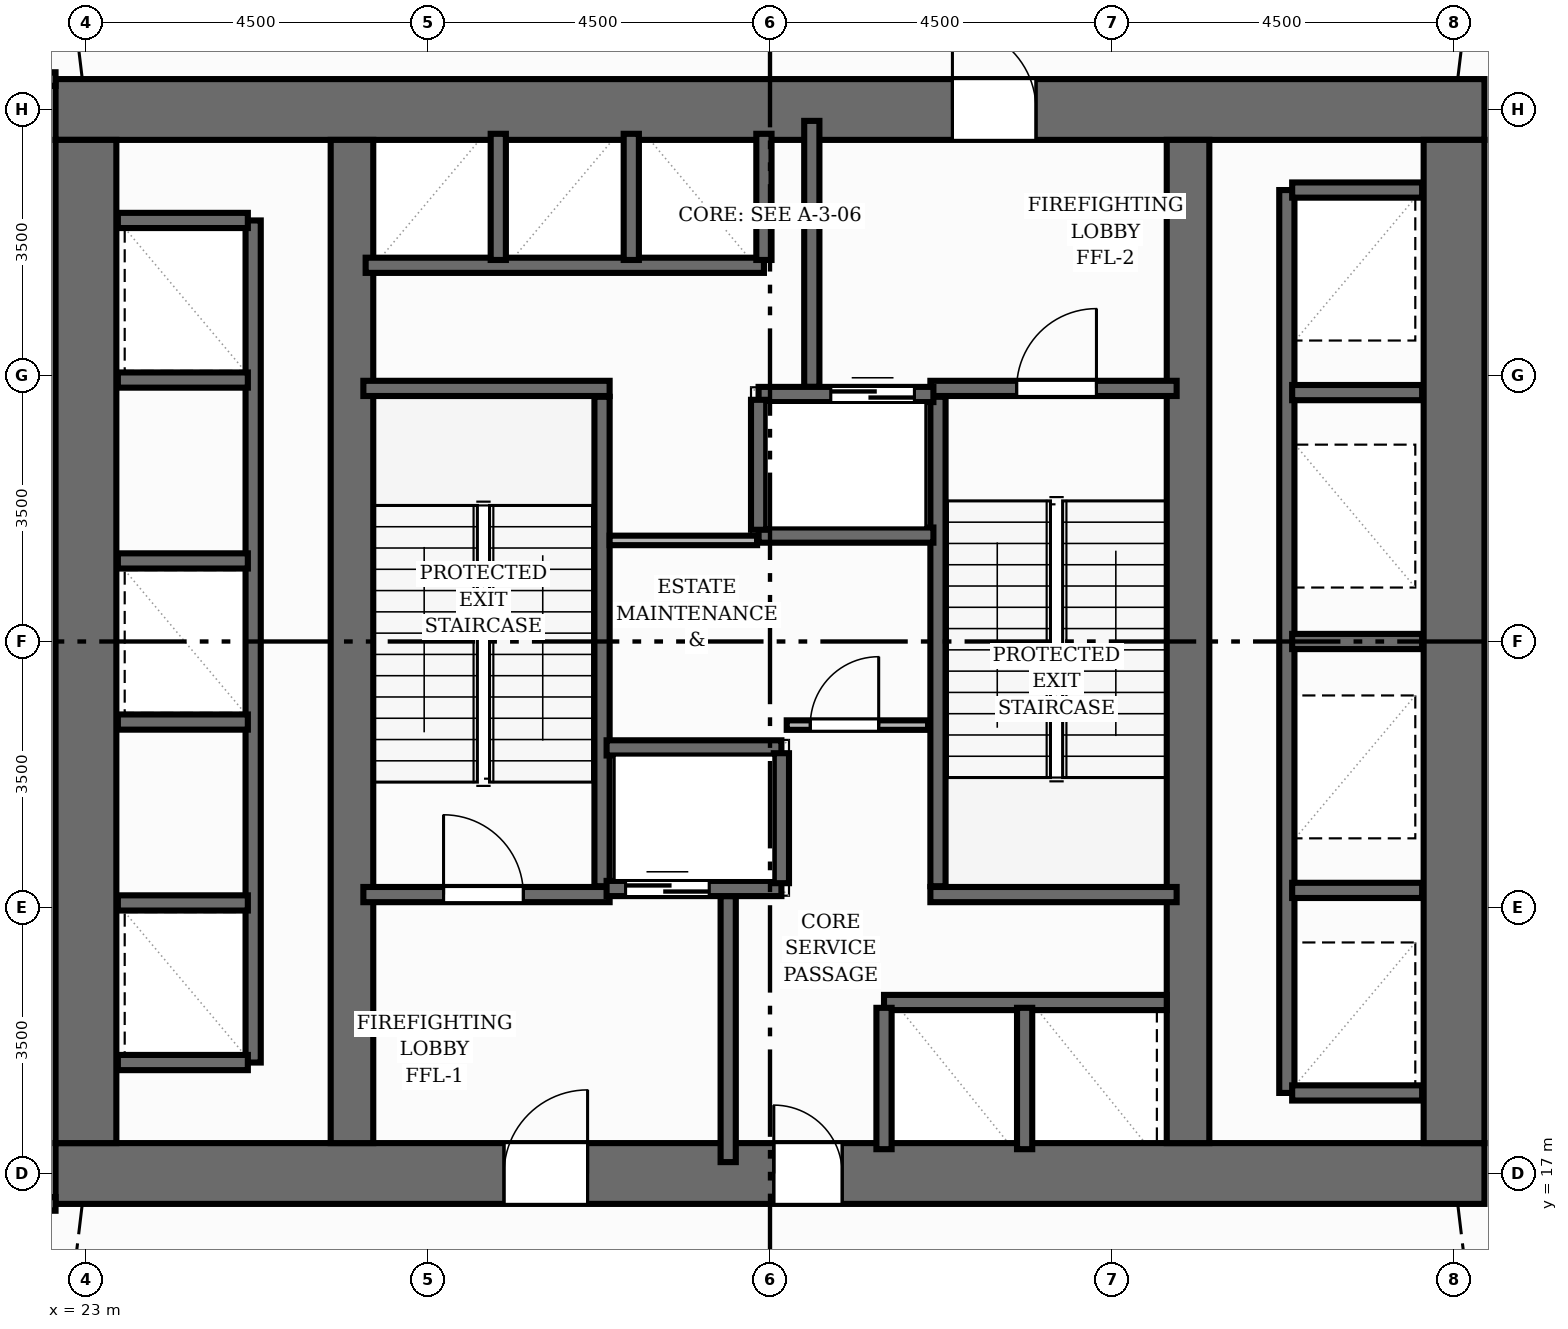
"""IFC4 building model, lengths in metres.
Left out: names, types, materials, properties, quantities, classifications, styles, units other than length and angle.
Written with IfcOpenShell. Run it as: python <this file> out.ifc"""

import sys

from ifc_helpers import new_model, si_unit, direction, frame, frame_2d, origin, place, context, subcontext, project, spatial, rectangle, extrude, element, fill, save


model = new_model("IFC4")
c1 = context("Model", 3, precision=1e-05, world=origin(), true_north=direction((0.0, 1.0)))
c2 = subcontext(c1, "Body", "Model", "MODEL_VIEW")
j1 = project(units=[si_unit("LENGTHUNIT", "METRE"), si_unit("PLANEANGLEUNIT", "RADIAN")], contexts=[c1])
p1 = place(None, origin())
s1 = spatial("IfcSite", under=j1, at=p1, CompositionType="ELEMENT")
p2 = place(p1, origin())
s2 = spatial("IfcBuilding", under=s1, at=p2, CompositionType="ELEMENT")
p3 = place(p2, frame((0.0, 0.0, 20.0)))
s3 = spatial("IfcBuildingStorey", under=s2, at=p3, CompositionType="ELEMENT", Elevation=20.0)
p4 = place(p3, frame((22.6, 17.0, 0.0), z_axis=(0.0, 0.0, 1.0), x_axis=(1.0, 0.0, 0.0)))
e1 = element("IfcWall", 1, at=p4, inside=s3, PredefinedType="SHEAR", context=c2, shape_type="SweptSolid", body=[
    extrude(rectangle(XDim=18.8, YDim=0.8, at=frame_2d((9.4, 0.0))), origin(), (0.0, 0.0, 1.0), 4.8),
])
p5 = place(p4, frame((5.9, 0.0, 0.0)))
e2 = element("IfcOpeningElement", 2, at=p5, cuts=e1, PredefinedType="OPENING", context=c2, shape_type="SweptSolid", body=[
    extrude(rectangle(XDim=1.1, YDim=2.15, at=frame_2d((0.55, 1.075))), frame((0.0, 0.41, 0.0), z_axis=(0.0, -1.0, 0.0), x_axis=(1.0, 0.0, 0.0)), (0.0, 0.0, 1.0), 0.82),
])
p6 = place(p4, frame((9.45, 0.0, 0.0)))
e3 = element("IfcOpeningElement", 3, at=p6, cuts=e1, PredefinedType="OPENING", context=c2, shape_type="SweptSolid", body=[
    extrude(rectangle(XDim=0.9, YDim=2.1, at=frame_2d((0.45, 1.05))), frame((0.0, 0.41, 0.0), z_axis=(0.0, -1.0, 0.0), x_axis=(1.0, 0.0, 0.0)), (0.0, 0.0, 1.0), 0.82),
])
p7 = place(p3, frame((22.6, 31.0, 0.0), z_axis=(0.0, 0.0, 1.0), x_axis=(1.0, 0.0, 0.0)))
e4 = element("IfcWall", 4, at=p7, inside=s3, PredefinedType="SHEAR", context=c2, shape_type="SweptSolid", body=[
    extrude(rectangle(XDim=18.8, YDim=0.8, at=frame_2d((9.4, 0.0))), origin(), (0.0, 0.0, 1.0), 4.8),
])
p8 = place(p7, frame((11.8, 0.0, 0.0)))
e5 = element("IfcOpeningElement", 5, at=p8, cuts=e4, PredefinedType="OPENING", context=c2, shape_type="SweptSolid", body=[
    extrude(rectangle(XDim=1.1, YDim=2.15, at=frame_2d((0.55, 1.075))), frame((0.0, 0.41, 0.0), z_axis=(0.0, -1.0, 0.0), x_axis=(1.0, 0.0, 0.0)), (0.0, 0.0, 1.0), 0.82),
])
for number, where, z_axis, x_axis in (
    (6, (23.0, 17.4, 0.0), (0.0, 0.0, 1.0), (0.0, 1.0, 0.0)),
    (7, (41.0, 17.4, 0.0), (0.0, 0.0, 1.0), (0.0, 1.0, 0.0)),
):
    element("IfcWall", number, at=place(p3, frame(where, z_axis=z_axis, x_axis=x_axis)), inside=s3, PredefinedType="SHEAR", context=c2, shape_type="SweptSolid", body=[
        extrude(rectangle(XDim=13.2, YDim=0.8, at=frame_2d((6.6, 0.0))), origin(), (0.0, 0.0, 1.0), 4.8),
    ])
for number, where, z_axis, x_axis in (
    (8, (26.5, 17.4, 0.0), (0.0, 0.0, 1.0), (0.0, 1.0, 0.0)),
    (9, (37.5, 17.4, 0.0), (0.0, 0.0, 1.0), (0.0, 1.0, 0.0)),
):
    element("IfcWall", number, at=place(p3, frame(where, z_axis=z_axis, x_axis=x_axis)), inside=s3, PredefinedType="SHEAR", context=c2, shape_type="SweptSolid", body=[
        extrude(rectangle(XDim=13.2, YDim=0.56, at=frame_2d((6.6, 0.0))), origin(), (0.0, 0.0, 1.0), 4.8),
    ])
p9 = place(p3, frame((29.79, 20.78, 0.0), z_axis=(0.0, 0.0, 1.0), x_axis=(0.0, 1.0, 0.0)))
e10 = element("IfcWall", 10, at=p9, inside=s3, PredefinedType="SHEAR", context=c2, shape_type="SweptSolid", body=[
    extrude(rectangle(XDim=6.44, YDim=0.2, at=frame_2d((3.22, 0.0))), origin(), (0.0, 0.0, 1.0), 4.8),
])
p10 = place(p3, frame((26.65, 27.33, 0.0), z_axis=(0.0, 0.0, 1.0), x_axis=(1.0, 0.0, 0.0)))
e11 = element("IfcWall", 11, at=p10, inside=s3, PredefinedType="SHEAR", context=c2, shape_type="SweptSolid", body=[
    extrude(rectangle(XDim=3.24, YDim=0.2, at=frame_2d((1.62, 0.0))), origin(), (0.0, 0.0, 1.0), 4.8),
])
p11 = place(p3, frame((26.65, 20.67, 0.0), z_axis=(0.0, 0.0, 1.0), x_axis=(1.0, 0.0, 0.0)))
e12 = element("IfcWall", 12, at=p11, inside=s3, PredefinedType="SHEAR", context=c2, shape_type="SweptSolid", body=[
    extrude(rectangle(XDim=3.24, YDim=0.2, at=frame_2d((1.62, 0.0))), origin(), (0.0, 0.0, 1.0), 4.8),
])
p12 = place(p11, frame((1.055, 0.0, 0.0)))
e13 = element("IfcOpeningElement", 13, at=p12, cuts=e12, PredefinedType="OPENING", context=c2, shape_type="SweptSolid", body=[
    extrude(rectangle(XDim=1.05, YDim=2.15, at=frame_2d((0.525, 1.075))), frame((0.0, 0.11, 0.0), z_axis=(0.0, -1.0, 0.0), x_axis=(1.0, 0.0, 0.0)), (0.0, 0.0, 1.0), 0.22),
])
p13 = place(p3, frame((34.21, 20.78, 0.0), z_axis=(0.0, 0.0, 1.0), x_axis=(0.0, 1.0, 0.0)))
e14 = element("IfcWall", 14, at=p13, inside=s3, PredefinedType="SHEAR", context=c2, shape_type="SweptSolid", body=[
    extrude(rectangle(XDim=6.44, YDim=0.2, at=frame_2d((3.22, 0.0))), origin(), (0.0, 0.0, 1.0), 4.8),
])
p14 = place(p3, frame((34.11, 20.67, 0.0), z_axis=(0.0, 0.0, 1.0), x_axis=(1.0, 0.0, 0.0)))
e15 = element("IfcWall", 15, at=p14, inside=s3, PredefinedType="SHEAR", context=c2, shape_type="SweptSolid", body=[
    extrude(rectangle(XDim=3.24, YDim=0.2, at=frame_2d((1.62, 0.0))), origin(), (0.0, 0.0, 1.0), 4.8),
])
p15 = place(p3, frame((34.11, 27.33, 0.0), z_axis=(0.0, 0.0, 1.0), x_axis=(1.0, 0.0, 0.0)))
e16 = element("IfcWall", 16, at=p15, inside=s3, PredefinedType="SHEAR", context=c2, shape_type="SweptSolid", body=[
    extrude(rectangle(XDim=3.24, YDim=0.2, at=frame_2d((1.62, 0.0))), origin(), (0.0, 0.0, 1.0), 4.8),
])
p16 = place(p15, frame((1.135, 0.0, 0.0)))
e17 = element("IfcOpeningElement", 17, at=p16, cuts=e16, PredefinedType="OPENING", context=c2, shape_type="SweptSolid", body=[
    extrude(rectangle(XDim=1.05, YDim=2.15, at=frame_2d((0.525, 1.075))), frame((0.0, 0.11, 0.0), z_axis=(0.0, -1.0, 0.0), x_axis=(1.0, 0.0, 0.0)), (0.0, 0.0, 1.0), 0.22),
])
for number, where, z_axis, x_axis in (
    (18, (31.45, 17.15, 0.0), (0.0, 0.0, 1.0), (0.0, 1.0, 0.0)),
    (19, (32.55, 27.35, 0.0), (0.0, 0.0, 1.0), (0.0, 1.0, 0.0)),
):
    element("IfcWall", number, at=place(p3, frame(where, z_axis=z_axis, x_axis=x_axis)), inside=s3, PredefinedType="SHEAR", context=c2, shape_type="SweptSolid", body=[
        extrude(rectangle(XDim=3.5, YDim=0.2, at=frame_2d((1.75, 0.0))), origin(), (0.0, 0.0, 1.0), 4.8),
    ])
p17 = place(p3, frame((29.85, 20.75, 0.0), z_axis=(0.0, 0.0, 1.0), x_axis=(1.0, 0.0, 0.0)))
e20 = element("IfcWall", 20, at=p17, inside=s3, PredefinedType="SHEAR", context=c2, shape_type="SweptSolid", body=[
    extrude(rectangle(XDim=2.3, YDim=0.2, at=frame_2d((1.15, 0.0))), origin(), (0.0, 0.0, 1.0), 4.8),
])
p18 = place(p17, frame((0.25, 0.0, 0.0)))
e21 = element("IfcOpeningElement", 21, at=p18, cuts=e20, PredefinedType="OPENING", context=c2, shape_type="SweptSolid", body=[
    extrude(rectangle(XDim=1.1, YDim=2.15, at=frame_2d((0.55, 1.075))), frame((0.0, 0.11, 0.0), z_axis=(0.0, -1.0, 0.0), x_axis=(1.0, 0.0, 0.0)), (0.0, 0.0, 1.0), 0.22),
])
p19 = place(p3, frame((29.85, 22.6, 0.0), z_axis=(0.0, 0.0, 1.0), x_axis=(1.0, 0.0, 0.0)))
e22 = element("IfcWall", 22, at=p19, inside=s3, PredefinedType="SHEAR", context=c2, shape_type="SweptSolid", body=[
    extrude(rectangle(XDim=2.3, YDim=0.2, at=frame_2d((1.15, 0.0))), origin(), (0.0, 0.0, 1.0), 4.8),
])
p20 = place(p3, frame((32.15, 20.82, 0.0), z_axis=(0.0, 0.0, 1.0), x_axis=(0.0, 1.0, 0.0)))
e23 = element("IfcWall", 23, at=p20, inside=s3, PredefinedType="SHEAR", context=c2, shape_type="SweptSolid", body=[
    extrude(rectangle(XDim=1.71, YDim=0.2, at=frame_2d((0.855, 0.0))), origin(), (0.0, 0.0, 1.0), 4.8),
])
p21 = place(p3, frame((31.85, 27.25, 0.0), z_axis=(0.0, 0.0, 1.0), x_axis=(1.0, 0.0, 0.0)))
e24 = element("IfcWall", 24, at=p21, inside=s3, PredefinedType="SHEAR", context=c2, shape_type="SweptSolid", body=[
    extrude(rectangle(XDim=2.3, YDim=0.2, at=frame_2d((1.15, 0.0))), origin(), (0.0, 0.0, 1.0), 4.8),
])
p22 = place(p21, frame((0.95, 0.0, 0.0)))
e25 = element("IfcOpeningElement", 25, at=p22, cuts=e24, PredefinedType="OPENING", context=c2, shape_type="SweptSolid", body=[
    extrude(rectangle(XDim=1.1, YDim=2.15, at=frame_2d((0.55, 1.075))), frame((0.0, 0.11, 0.0), z_axis=(0.0, -1.0, 0.0), x_axis=(1.0, 0.0, 0.0)), (0.0, 0.0, 1.0), 0.22),
])
p23 = place(p3, frame((31.85, 25.4, 0.0), z_axis=(0.0, 0.0, 1.0), x_axis=(1.0, 0.0, 0.0)))
e26 = element("IfcWall", 26, at=p23, inside=s3, PredefinedType="SHEAR", context=c2, shape_type="SweptSolid", body=[
    extrude(rectangle(XDim=2.3, YDim=0.2, at=frame_2d((1.15, 0.0))), origin(), (0.0, 0.0, 1.0), 4.8),
])
p24 = place(p3, frame((31.85, 25.47, 0.0), z_axis=(0.0, 0.0, 1.0), x_axis=(0.0, 1.0, 0.0)))
e27 = element("IfcWall", 27, at=p24, inside=s3, PredefinedType="SHEAR", context=c2, shape_type="SweptSolid", body=[
    extrude(rectangle(XDim=1.71, YDim=0.2, at=frame_2d((0.855, 0.0))), origin(), (0.0, 0.0, 1.0), 4.8),
])
p25 = place(p3, frame((38.8, 18.06, 0.0), z_axis=(0.0, 0.0, 1.0), x_axis=(0.0, 1.0, 0.0)))
e28 = element("IfcWall", 28, at=p25, inside=s3, PredefinedType="SHEAR", context=c2, shape_type="SweptSolid", body=[
    extrude(rectangle(XDim=11.88, YDim=0.2, at=frame_2d((5.94, 0.0))), origin(), (0.0, 0.0, 1.0), 4.8),
])
for number, where, z_axis, x_axis in (
    (29, (38.87, 18.06, 0.0), (0.0, 0.0, 1.0), (1.0, 0.0, 0.0)),
    (30, (38.87, 29.94, 0.0), (0.0, 0.0, 1.0), (1.0, 0.0, 0.0)),
    (31, (38.87, 20.725, 0.0), (0.0, 0.0, 1.0), (1.0, 0.0, 0.0)),
    (32, (38.87, 24.0, 0.0), (0.0, 0.0, 1.0), (1.0, 0.0, 0.0)),
    (33, (38.87, 27.275, 0.0), (0.0, 0.0, 1.0), (1.0, 0.0, 0.0)),
):
    element("IfcWall", number, at=place(p3, frame(where, z_axis=z_axis, x_axis=x_axis)), inside=s3, PredefinedType="SHEAR", context=c2, shape_type="SweptSolid", body=[
        extrude(rectangle(XDim=1.71, YDim=0.2, at=frame_2d((0.855, 0.0))), origin(), (0.0, 0.0, 1.0), 4.8),
    ])
p26 = place(p3, frame((25.2, 18.46, 0.0), z_axis=(0.0, 0.0, 1.0), x_axis=(0.0, 1.0, 0.0)))
e34 = element("IfcWall", 34, at=p26, inside=s3, PredefinedType="SHEAR", context=c2, shape_type="SweptSolid", body=[
    extrude(rectangle(XDim=11.08, YDim=0.2, at=frame_2d((5.54, 0.0))), origin(), (0.0, 0.0, 1.0), 4.8),
])
for number, where, z_axis, x_axis in (
    (35, (23.42, 18.46, 0.0), (0.0, 0.0, 1.0), (1.0, 0.0, 0.0)),
    (36, (23.42, 29.54, 0.0), (0.0, 0.0, 1.0), (1.0, 0.0, 0.0)),
    (37, (23.42, 20.56, 0.0), (0.0, 0.0, 1.0), (1.0, 0.0, 0.0)),
    (38, (23.42, 22.94, 0.0), (0.0, 0.0, 1.0), (1.0, 0.0, 0.0)),
    (39, (23.42, 25.06, 0.0), (0.0, 0.0, 1.0), (1.0, 0.0, 0.0)),
    (40, (23.42, 27.44, 0.0), (0.0, 0.0, 1.0), (1.0, 0.0, 0.0)),
):
    element("IfcWall", number, at=place(p3, frame(where, z_axis=z_axis, x_axis=x_axis)), inside=s3, PredefinedType="SHEAR", context=c2, shape_type="SweptSolid", body=[
        extrude(rectangle(XDim=1.71, YDim=0.2, at=frame_2d((0.855, 0.0))), origin(), (0.0, 0.0, 1.0), 4.8),
    ])
p27 = place(p3, frame((26.68, 28.95, 0.0), z_axis=(0.0, 0.0, 1.0), x_axis=(1.0, 0.0, 0.0)))
e41 = element("IfcWall", 41, at=p27, inside=s3, PredefinedType="SHEAR", context=c2, shape_type="SweptSolid", body=[
    extrude(rectangle(XDim=5.24, YDim=0.2, at=frame_2d((2.62, 0.0))), origin(), (0.0, 0.0, 1.0), 4.8),
])
for number, where, z_axis, x_axis in (
    (42, (31.92, 29.02, 0.0), (0.0, 0.0, 1.0), (0.0, 1.0, 0.0)),
    (43, (28.425, 29.02, 0.0), (0.0, 0.0, 1.0), (0.0, 1.0, 0.0)),
    (44, (30.175, 29.02, 0.0), (0.0, 0.0, 1.0), (0.0, 1.0, 0.0)),
):
    element("IfcWall", number, at=place(p3, frame(where, z_axis=z_axis, x_axis=x_axis)), inside=s3, PredefinedType="SHEAR", context=c2, shape_type="SweptSolid", body=[
        extrude(rectangle(XDim=1.66, YDim=0.2, at=frame_2d((0.83, 0.0))), origin(), (0.0, 0.0, 1.0), 4.8),
    ])
p28 = place(p3, frame((33.5, 19.25, 0.0), z_axis=(0.0, 0.0, 1.0), x_axis=(1.0, 0.0, 0.0)))
e45 = element("IfcWall", 45, at=p28, inside=s3, PredefinedType="SHEAR", context=c2, shape_type="SweptSolid", body=[
    extrude(rectangle(XDim=3.72, YDim=0.2, at=frame_2d((1.86, 0.0))), origin(), (0.0, 0.0, 1.0), 4.8),
])
for number, where, z_axis, x_axis in (
    (46, (33.5, 17.32, 0.0), (0.0, 0.0, 1.0), (0.0, 1.0, 0.0)),
    (47, (35.35, 17.32, 0.0), (0.0, 0.0, 1.0), (0.0, 1.0, 0.0)),
):
    element("IfcWall", number, at=place(p3, frame(where, z_axis=z_axis, x_axis=x_axis)), inside=s3, PredefinedType="SHEAR", context=c2, shape_type="SweptSolid", body=[
        extrude(rectangle(XDim=1.86, YDim=0.2, at=frame_2d((0.93, 0.0))), origin(), (0.0, 0.0, 1.0), 4.8),
    ])
p29 = place(p3, frame((32.22, 22.9, 0.0), z_axis=(0.0, 0.0, 1.0), x_axis=(1.0, 0.0, 0.0)))
e48 = element("IfcWall", 48, at=p29, inside=s3, PredefinedType="PARTITIONING", context=c2, shape_type="SweptSolid", body=[
    extrude(rectangle(XDim=1.86, YDim=0.125, at=frame_2d((0.93, 0.0))), origin(), (0.0, 0.0, 1.0), 4.345),
])
p30 = place(p29, frame((0.31, 0.0, 0.0)))
e49 = element("IfcOpeningElement", 49, at=p30, cuts=e48, PredefinedType="OPENING", context=c2, shape_type="SweptSolid", body=[
    extrude(rectangle(XDim=0.9, YDim=2.1, at=frame_2d((0.45, 1.05))), frame((0.0, 0.073, 0.0), z_axis=(0.0, -1.0, 0.0), x_axis=(1.0, 0.0, 0.0)), (0.0, 0.0, 1.0), 0.145),
])
p31 = place(p3, frame((29.89, 25.33, 0.0), z_axis=(0.0, 0.0, 1.0), x_axis=(1.0, 0.0, 0.0)))
e50 = element("IfcWall", 50, at=p31, inside=s3, PredefinedType="PARTITIONING", context=c2, shape_type="SweptSolid", body=[
    extrude(rectangle(XDim=1.94, YDim=0.125, at=frame_2d((0.97, 0.0))), origin(), (0.0, 0.0, 1.0), 4.345),
])
p32 = place(p3, frame((22.6, 31.4, 0.0), z_axis=(0.0, 0.0, 1.0), x_axis=(-1.0, 0.0, 0.0)))
e51 = element("IfcWall", 51, at=p32, inside=s3, PredefinedType="PARTITIONING", context=c2, shape_type="SweptSolid", body=[
    extrude(rectangle(XDim=2.77, YDim=0.18, at=frame_2d((1.385, 0.0))), origin(), (0.0, 0.0, 1.0), 2.588),
])
p33 = place(p32, frame((0.86, 0.0, 0.0)))
e52 = element("IfcOpeningElement", 52, at=p33, cuts=e51, PredefinedType="OPENING", context=c2, shape_type="SweptSolid", body=[
    extrude(rectangle(XDim=1.05, YDim=2.15, at=frame_2d((0.525, 1.075))), frame((0.0, 0.1, 0.0), z_axis=(0.0, -1.0, 0.0), x_axis=(1.0, 0.0, 0.0)), (0.0, 0.0, 1.0), 0.2),
])
p34 = place(p3, frame((19.83, 16.6, 0.0), z_axis=(0.0, 0.0, 1.0), x_axis=(1.0, 0.0, 0.0)))
e53 = element("IfcWall", 53, at=p34, inside=s3, PredefinedType="PARTITIONING", context=c2, shape_type="SweptSolid", body=[
    extrude(rectangle(XDim=2.77, YDim=0.18, at=frame_2d((1.385, 0.0))), origin(), (0.0, 0.0, 1.0), 2.588),
])
p35 = place(p12, origin())
e54 = element("IfcDoor", 54, at=p35, inside=s3, OperationType="SINGLE_SWING_LEFT", PredefinedType="DOOR", context=c2, shape_type="SweptSolid", body=[
    extrude(rectangle(XDim=1.05, YDim=2.15, at=frame_2d((0.525, 1.075))), frame((0.0, 0.025, 0.0), z_axis=(0.0, -1.0, 0.0), x_axis=(1.0, 0.0, 0.0)), (0.0, 0.0, 1.0), 0.05),
])
fill(e13, e54)
p36 = place(p16, origin())
e55 = element("IfcDoor", 55, at=p36, inside=s3, OperationType="SINGLE_SWING_RIGHT", PredefinedType="DOOR", context=c2, shape_type="SweptSolid", body=[
    extrude(rectangle(XDim=1.05, YDim=2.15, at=frame_2d((0.525, 1.075))), frame((0.0, 0.025, 0.0), z_axis=(0.0, -1.0, 0.0), x_axis=(1.0, 0.0, 0.0)), (0.0, 0.0, 1.0), 0.05),
])
fill(e17, e55)
p37 = place(p5, origin())
e56 = element("IfcDoor", 56, at=p37, inside=s3, OperationType="SINGLE_SWING_RIGHT", PredefinedType="DOOR", context=c2, shape_type="SweptSolid", body=[
    extrude(rectangle(XDim=1.1, YDim=2.15, at=frame_2d((0.55, 1.075))), frame((0.0, 0.025, 0.0), z_axis=(0.0, -1.0, 0.0), x_axis=(1.0, 0.0, 0.0)), (0.0, 0.0, 1.0), 0.05),
])
fill(e2, e56)
p38 = place(p8, origin())
e57 = element("IfcDoor", 57, at=p38, inside=s3, OperationType="SINGLE_SWING_LEFT", PredefinedType="DOOR", context=c2, shape_type="SweptSolid", body=[
    extrude(rectangle(XDim=1.1, YDim=2.15, at=frame_2d((0.55, 1.075))), frame((0.0, 0.025, 0.0), z_axis=(0.0, -1.0, 0.0), x_axis=(1.0, 0.0, 0.0)), (0.0, 0.0, 1.0), 0.05),
])
fill(e5, e57)
p39 = place(p18, origin())
e58 = element("IfcDoor", 58, at=p39, inside=s3, OperationType="DOUBLE_DOOR_SLIDING", PredefinedType="DOOR", context=c2, shape_type="SweptSolid", body=[
    extrude(rectangle(XDim=1.1, YDim=2.15, at=frame_2d((0.55, 1.075))), frame((0.0, 0.025, 0.0), z_axis=(0.0, -1.0, 0.0), x_axis=(1.0, 0.0, 0.0)), (0.0, 0.0, 1.0), 0.05),
])
fill(e21, e58)
p40 = place(p22, origin())
e59 = element("IfcDoor", 59, at=p40, inside=s3, OperationType="DOUBLE_DOOR_SLIDING", PredefinedType="DOOR", context=c2, shape_type="SweptSolid", body=[
    extrude(rectangle(XDim=1.1, YDim=2.15, at=frame_2d((0.55, 1.075))), frame((0.0, 0.025, 0.0), z_axis=(0.0, -1.0, 0.0), x_axis=(1.0, 0.0, 0.0)), (0.0, 0.0, 1.0), 0.05),
])
fill(e25, e59)
p41 = place(p6, origin())
e60 = element("IfcDoor", 60, at=p41, inside=s3, OperationType="SINGLE_SWING_LEFT", PredefinedType="DOOR", context=c2, shape_type="SweptSolid", body=[
    extrude(rectangle(XDim=0.9, YDim=2.1, at=frame_2d((0.45, 1.05))), frame((0.0, 0.025, 0.0), z_axis=(0.0, -1.0, 0.0), x_axis=(1.0, 0.0, 0.0)), (0.0, 0.0, 1.0), 0.05),
])
fill(e3, e60)
p42 = place(p30, origin())
e61 = element("IfcDoor", 61, at=p42, inside=s3, OperationType="SINGLE_SWING_RIGHT", PredefinedType="DOOR", context=c2, shape_type="SweptSolid", body=[
    extrude(rectangle(XDim=0.9, YDim=2.1, at=frame_2d((0.45, 1.05))), frame((0.0, 0.025, 0.0), z_axis=(0.0, -1.0, 0.0), x_axis=(1.0, 0.0, 0.0)), (0.0, 0.0, 1.0), 0.05),
])
fill(e49, e61)
save(model, sys.argv[1])
